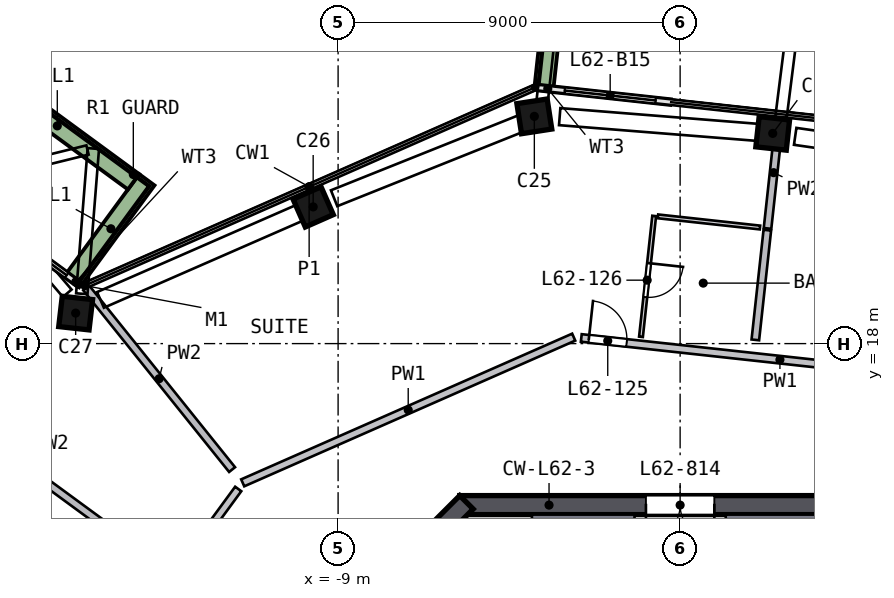
"""IFC4 building model, lengths in metres.
Left out: names, types, materials, properties, quantities, classifications, styles, units other than length and angle.
Written with IfcOpenShell. Run it as: python <this file> out.ifc"""

import sys

from ifc_helpers import new_model, si_unit, direction, frame, frame_2d, origin, origin_2d, place, context, subcontext, project, spatial, polyline, rectangle, outline, extrude, element, fill, save


model = new_model("IFC4")
c1 = context("Model", 3, precision=1e-05, world=origin(), true_north=direction((0.0, 1.0)))
c2 = subcontext(c1, "Body", "Model", "MODEL_VIEW")
j1 = project(units=[si_unit("LENGTHUNIT", "METRE"), si_unit("PLANEANGLEUNIT", "RADIAN")], contexts=[c1])
p1 = place(None, origin())
s1 = spatial("IfcSite", under=j1, at=p1, CompositionType="ELEMENT")
p2 = place(p1, origin())
s2 = spatial("IfcBuilding", under=s1, at=p2, CompositionType="ELEMENT")
p3 = place(p2, frame((0.0, 0.0, 252.5)))
s3 = spatial("IfcBuildingStorey", under=s2, at=p3, CompositionType="ELEMENT", Elevation=252.5)
p4 = place(p3, frame((2.572, 23.518, 0.0), z_axis=(-0.112018614, 0.011255095, 0.993642367), x_axis=(-0.987786416, 0.107722097, -0.112578621)))
e1 = element("IfcColumn", 1, at=p4, inside=s3, PredefinedType="COLUMN", context=c2, shape_type="SweptSolid", body=[
    extrude(rectangle(XDim=0.8, YDim=0.8, at=origin_2d()), origin(), (0.0, 0.0, 1.0), 3.21),
])
p5 = place(p3, frame((-3.698, 24.003, 0.0), z_axis=(-0.114033037, -0.018549374, 0.993303774), x_axis=(0.981736484, 0.151151624, 0.115527761)))
e2 = element("IfcColumn", 2, at=p5, inside=s3, PredefinedType="COLUMN", context=c2, shape_type="SweptSolid", body=[
    extrude(rectangle(XDim=0.8, YDim=0.8, at=origin_2d()), origin(), (0.0, 0.0, 1.0), 3.211),
])
p6 = place(p3, frame((-9.532, 21.653, 0.0), z_axis=(-0.10266456, -0.046237076, 0.993640841), x_axis=(-0.909427025, -0.400331749, -0.112592085)))
e3 = element("IfcColumn", 3, at=p6, inside=s3, PredefinedType="COLUMN", context=c2, shape_type="SweptSolid", body=[
    extrude(rectangle(XDim=0.8, YDim=0.8, at=origin_2d()), origin(), (0.0, 0.0, 1.0), 3.21),
])
p7 = place(p3, frame((-15.798, 18.895, 0.0), z_axis=(-0.089233164, -0.07585579, 0.99311799), x_axis=(0.990082545, -0.115381755, 0.080147399)))
e4 = element("IfcColumn", 4, at=p7, inside=s3, PredefinedType="COLUMN", context=c2, shape_type="SweptSolid", body=[
    extrude(rectangle(XDim=0.8, YDim=0.8, at=origin_2d()), origin(), (0.0, 0.0, 1.0), 3.212),
])
p8 = place(p3, frame((5.799, 13.75, 0.0), z_axis=(0.0, 0.0, 1.0), x_axis=(-1.0, 0.0, 0.0)))
e5 = element("IfcWall", 5, at=p8, inside=s3, PredefinedType="SHEAR", context=c2, shape_type="SweptSolid", body=[
    extrude(rectangle(XDim=11.598, YDim=0.5, at=frame_2d((5.799, 0.0))), origin(), (0.0, 0.0, 1.0), 3.5),
])
p9 = place(p8, frame((4.899, 0.0, 0.0)))
e6 = element("IfcOpeningElement", 6, at=p9, cuts=e5, PredefinedType="OPENING", context=c2, shape_type="SweptSolid", body=[
    extrude(rectangle(XDim=1.8, YDim=2.1, at=frame_2d((0.9, 1.05))), frame((0.0, 0.26, 0.0), z_axis=(0.0, -1.0, 0.0), x_axis=(1.0, 0.0, 0.0)), (0.0, 0.0, 1.0), 0.52),
])
p10 = place(p3, frame((-5.622, 13.823, 0.0), z_axis=(0.0, 0.0, 1.0), x_axis=(-0.707106781, -0.707106781, 0.0)))
e7 = element("IfcWall", 7, at=p10, inside=s3, PredefinedType="SHEAR", context=c2, shape_type="SweptSolid", body=[
    extrude(rectangle(XDim=11.598, YDim=0.5, at=frame_2d((5.799, 0.0))), origin(), (0.0, 0.0, 1.0), 3.5),
])
p11 = place(p3, frame((-15.824, 19.564, 0.0), z_axis=(0.0, 0.0, 1.0), x_axis=(-0.806550088, 0.59116576, 0.0)))
e8 = element("IfcWall", 8, at=p11, inside=s3, PredefinedType="SOLIDWALL", context=c2, shape_type="SweptSolid", body=[
    extrude(rectangle(XDim=2.3, YDim=0.15, at=frame_2d((1.15, 0.0))), origin(), (0.0, 0.0, 1.0), 2.525),
])
p12 = place(p11, frame((0.4, 0.0, 0.0)))
e9 = element("IfcOpeningElement", 9, at=p12, cuts=e8, PredefinedType="OPENING", context=c2, shape_type="SweptSolid", body=[
    extrude(rectangle(XDim=1.5, YDim=2.4, at=frame_2d((0.75, 1.2))), frame((0.0, 0.085, 0.0), z_axis=(0.0, -1.0, 0.0), x_axis=(1.0, 0.0, 0.0)), (0.0, 0.0, 1.0), 0.17),
])
p13 = place(p3, frame((-0.25, 24.355, 0.0), z_axis=(0.0, 0.0, 1.0), x_axis=(-0.994075927, 0.108687864, 0.0)))
e10 = element("IfcWall", 10, at=p13, inside=s3, PredefinedType="SOLIDWALL", context=c2, shape_type="SweptSolid", body=[
    extrude(rectangle(XDim=3.504, YDim=0.15, at=frame_2d((1.752, 0.0))), origin(), (0.0, 0.0, 1.0), 2.525),
])
p14 = place(p13, frame((0.4, 0.0, 0.0)))
e11 = element("IfcOpeningElement", 11, at=p14, cuts=e10, PredefinedType="OPENING", context=c2, shape_type="SweptSolid", body=[
    extrude(rectangle(XDim=2.4, YDim=2.4, at=frame_2d((1.2, 1.2))), frame((0.0, 0.085, 0.0), z_axis=(0.0, -1.0, 0.0), x_axis=(1.0, 0.0, 0.0)), (0.0, 0.0, 1.0), 0.17),
])
p15 = place(p3, frame((-3.283, 27.478, 0.0), z_axis=(0.0, 0.0, 1.0), x_axis=(-0.108723798, -0.994071997, 0.0)))
e12 = element("IfcWall", 12, at=p15, inside=s3, PredefinedType="SOLIDWALL", context=c2, shape_type="SweptSolid", body=[
    extrude(rectangle(XDim=2.699, YDim=0.5, at=frame_2d((1.35, 0.0))), origin(), (0.0, 0.0, 1.0), 0.7),
])
p16 = place(p3, frame((-15.924, 19.732, 0.0), z_axis=(0.0, 0.0, 1.0), x_axis=(0.591221389, 0.806509311, 0.0)))
e13 = element("IfcWall", 13, at=p16, inside=s3, PredefinedType="SOLIDWALL", context=c2, shape_type="SweptSolid", body=[
    extrude(rectangle(XDim=3.199, YDim=0.5, at=frame_2d((1.6, 0.0))), origin(), (0.0, 0.0, 1.0), 0.7),
])
p17 = place(p3, frame((-14.382, 22.258, 0.0), z_axis=(0.0, 0.0, 1.0), x_axis=(-0.806539101, 0.59118075, 0.0)))
e14 = element("IfcWall", 14, at=p17, inside=s3, PredefinedType="SOLIDWALL", context=c2, shape_type="SweptSolid", body=[
    extrude(rectangle(XDim=4.977, YDim=0.5, at=frame_2d((2.488, 0.0))), origin(), (0.0, 0.0, 1.0), 0.7),
])
p18 = place(p3, origin())
e15 = element("IfcWall", 15, at=p18, inside=s3, PredefinedType="SOLIDWALL", context=c2, shape_type="SweptSolid", body=[
    extrude(outline(polyline([(3.9, 9.9), (3.7, 9.9), (3.7, 12.9), (1.4, 12.9), (1.4, 9.9), (1.2, 9.9), (1.2, 13.5), (3.9, 13.5), (3.9, 9.9)])), origin(), (0.0, 0.0, 1.0), 3.19),
])
p19 = place(p3, origin())
e16 = element("IfcWall", 16, at=p19, inside=s3, PredefinedType="SOLIDWALL", context=c2, shape_type="SweptSolid", body=[
    extrude(outline(polyline([(-3.9, 13.5), (-1.2, 13.5), (-1.2, 9.9), (-1.4, 9.9), (-1.4, 12.9), (-3.7, 12.9), (-3.7, 9.9), (-3.9, 9.9), (-3.9, 13.5)])), origin(), (0.0, 0.0, 1.0), 3.19),
])
p20 = place(p3, frame((-17.136, 6.66, 0.0), z_axis=(0.0, 0.0, 1.0), x_axis=(0.591171658, 0.806545765, 0.0)))
e17 = element("IfcWall", 17, at=p20, inside=s3, PredefinedType="SOLIDWALL", context=c2, shape_type="SweptSolid", body=[
    extrude(rectangle(XDim=9.317, YDim=0.2, at=frame_2d((4.658, 0.0))), origin(), (0.0, 0.0, 1.0), 3.19),
])
p21 = place(p20, frame((3.85, 0.0, 0.0)))
e18 = element("IfcOpeningElement", 18, at=p21, cuts=e17, PredefinedType="OPENING", context=c2, shape_type="SweptSolid", body=[
    extrude(rectangle(XDim=1.8, YDim=2.1, at=frame_2d((0.9, 1.05))), frame((0.0, 0.11, 0.0), z_axis=(0.0, -1.0, 0.0), x_axis=(1.0, 0.0, 0.0)), (0.0, 0.0, 1.0), 0.22),
])
p22 = place(p3, frame((-2.8, 18.17, 0.0), z_axis=(0.0, 0.0, 1.0), x_axis=(-0.915239358, -0.402910557, 0.0)))
e19 = element("IfcWall", 19, at=p22, inside=s3, PredefinedType="SOLIDWALL", context=c2, shape_type="SweptSolid", body=[
    extrude(rectangle(XDim=9.516, YDim=0.2, at=frame_2d((4.758, 0.0))), origin(), (0.0, 0.0, 1.0), 3.19),
])
p23 = place(p3, frame((-2.601, 18.148, 0.0), z_axis=(0.0, 0.0, 1.0), x_axis=(0.994076214, -0.108685238, 0.0)))
e20 = element("IfcWall", 20, at=p23, inside=s3, PredefinedType="SOLIDWALL", context=c2, shape_type="SweptSolid", body=[
    extrude(rectangle(XDim=9.115, YDim=0.2, at=frame_2d((4.558, 0.0))), origin(), (0.0, 0.0, 1.0), 3.19),
])
p24 = place(p23, frame((0.2, 0.0, 0.0)))
e21 = element("IfcOpeningElement", 21, at=p24, cuts=e20, PredefinedType="OPENING", context=c2, shape_type="SweptSolid", body=[
    extrude(rectangle(XDim=1.0, YDim=2.1, at=frame_2d((0.5, 1.05))), frame((0.0, 0.11, 0.0), z_axis=(0.0, -1.0, 0.0), x_axis=(1.0, 0.0, 0.0)), (0.0, 0.0, 1.0), 0.22),
])
p25 = place(p3, frame((-15.435, 9.32, 0.0), z_axis=(0.0, 0.0, 1.0), x_axis=(-0.806554833, 0.591159286, 0.0)))
e22 = element("IfcWall", 22, at=p25, inside=s3, PredefinedType="SOLIDWALL", context=c2, shape_type="SweptSolid", body=[
    extrude(rectangle(XDim=15.227, YDim=0.2, at=frame_2d((7.613, 0.0))), origin(), (0.0, 0.0, 1.0), 3.19),
])
p26 = place(p25, frame((4.75, 0.0, 0.0)))
e23 = element("IfcOpeningElement", 23, at=p26, cuts=e22, PredefinedType="OPENING", context=c2, shape_type="SweptSolid", body=[
    extrude(rectangle(XDim=1.0, YDim=2.1, at=frame_2d((0.5, 1.05))), frame((0.0, 0.11, 0.0), z_axis=(0.0, -1.0, 0.0), x_axis=(1.0, 0.0, 0.0)), (0.0, 0.0, 1.0), 0.22),
])
p27 = place(p3, frame((-25.756, 20.995, 0.0), z_axis=(0.0, 0.0, 1.0), x_axis=(0.806541585, -0.591177361, 0.0)))
e24 = element("IfcWall", 24, at=p27, inside=s3, PredefinedType="SOLIDWALL", context=c2, shape_type="SweptSolid", body=[
    extrude(rectangle(XDim=15.227, YDim=0.2, at=frame_2d((7.613, 0.0))), origin(), (0.0, 0.0, 1.0), 3.19),
])
p28 = place(p27, frame((4.8, 0.0, 0.0)))
e25 = element("IfcOpeningElement", 25, at=p28, cuts=e24, PredefinedType="OPENING", context=c2, shape_type="SweptSolid", body=[
    extrude(rectangle(XDim=1.0, YDim=2.1, at=frame_2d((0.5, 1.05))), frame((0.0, 0.11, 0.0), z_axis=(0.0, -1.0, 0.0), x_axis=(1.0, 0.0, 0.0)), (0.0, 0.0, 1.0), 0.22),
])
p29 = place(p3, frame((-15.629, 19.466, 0.0), z_axis=(0.0, 0.0, 1.0), x_axis=(0.626077852, -0.779760555, 0.0)))
e26 = element("IfcWall", 26, at=p29, inside=s3, PredefinedType="SOLIDWALL", context=c2, shape_type="SweptSolid", body=[
    extrude(rectangle(XDim=6.132, YDim=0.2, at=frame_2d((3.066, 0.0))), origin(), (0.0, 0.0, 1.0), 3.19),
])
p30 = place(p3, frame((1.979, 18.098, 0.0), z_axis=(0.0, 0.0, 1.0), x_axis=(0.108752544, 0.994068853, 0.0)))
e27 = element("IfcWall", 27, at=p30, inside=s3, PredefinedType="SOLIDWALL", context=c2, shape_type="SweptSolid", body=[
    extrude(rectangle(XDim=2.905, YDim=0.2, at=frame_2d((1.453, 0.0))), origin(), (0.0, 0.0, 1.0), 3.19),
])
p31 = place(p3, frame((2.3, 21.031, 0.0), z_axis=(0.0, 0.0, 1.0), x_axis=(0.10867934, 0.994076859, 0.0)))
e28 = element("IfcWall", 28, at=p31, inside=s3, PredefinedType="SOLIDWALL", context=c2, shape_type="SweptSolid", body=[
    extrude(rectangle(XDim=2.952, YDim=0.2, at=frame_2d((1.476, 0.0))), origin(), (0.0, 0.0, 1.0), 3.19),
])
p32 = place(p3, frame((-0.683, 21.359, 0.0), z_axis=(0.0, 0.0, 1.0), x_axis=(-0.108639421, -0.994081222, 0.0)))
e29 = element("IfcWall", 29, at=p32, inside=s3, PredefinedType="PARTITIONING", context=c2, shape_type="SweptSolid", body=[
    extrude(rectangle(XDim=3.2, YDim=0.1, at=frame_2d((1.6, 0.0))), origin(), (0.0, 0.0, 1.0), 3.19),
])
p33 = place(p32, frame((1.25, 0.0, 0.0)))
e30 = element("IfcOpeningElement", 30, at=p33, cuts=e29, PredefinedType="OPENING", context=c2, shape_type="SweptSolid", body=[
    extrude(rectangle(XDim=0.9, YDim=2.1, at=frame_2d((0.45, 1.05))), frame((0.0, 0.06, 0.0), z_axis=(0.0, -1.0, 0.0), x_axis=(1.0, 0.0, 0.0)), (0.0, 0.0, 1.0), 0.12),
])
p34 = place(p3, frame((-0.583, 21.348, 0.0), z_axis=(0.0, 0.0, 1.0), x_axis=(0.994076272, -0.108684708, 0.0)))
e31 = element("IfcWall", 31, at=p34, inside=s3, PredefinedType="PARTITIONING", context=c2, shape_type="SweptSolid", body=[
    extrude(rectangle(XDim=2.7, YDim=0.1, at=frame_2d((1.35, 0.0))), origin(), (0.0, 0.0, 1.0), 3.19),
])
p35 = place(p12, origin())
e32 = element("IfcDoor", 32, at=p35, inside=s3, OperationType="SLIDING_TO_LEFT", PredefinedType="DOOR", context=c2, shape_type="SweptSolid", body=[
    extrude(rectangle(XDim=1.5, YDim=2.4, at=frame_2d((0.75, 1.2))), frame((0.0, 0.025, 0.0), z_axis=(0.0, -1.0, 0.0), x_axis=(1.0, 0.0, 0.0)), (0.0, 0.0, 1.0), 0.05),
])
fill(e9, e32)
p36 = place(p14, origin())
e33 = element("IfcDoor", 33, at=p36, inside=s3, OperationType="SLIDING_TO_RIGHT", PredefinedType="DOOR", context=c2, shape_type="SweptSolid", body=[
    extrude(rectangle(XDim=2.4, YDim=2.4, at=frame_2d((1.2, 1.2))), frame((0.0, 0.025, 0.0), z_axis=(0.0, -1.0, 0.0), x_axis=(1.0, 0.0, 0.0)), (0.0, 0.0, 1.0), 0.05),
])
fill(e11, e33)
p37 = place(p9, origin())
e34 = element("IfcDoor", 34, at=p37, inside=s3, OperationType="DOUBLE_DOOR_SINGLE_SWING", PredefinedType="DOOR", context=c2, shape_type="SweptSolid", body=[
    extrude(rectangle(XDim=1.8, YDim=2.1, at=frame_2d((0.9, 1.05))), frame((0.0, 0.025, 0.0), z_axis=(0.0, -1.0, 0.0), x_axis=(1.0, 0.0, 0.0)), (0.0, 0.0, 1.0), 0.05),
])
fill(e6, e34)
p38 = place(p24, origin())
e35 = element("IfcDoor", 35, at=p38, inside=s3, OperationType="SINGLE_SWING_LEFT", PredefinedType="DOOR", context=c2, shape_type="SweptSolid", body=[
    extrude(rectangle(XDim=1.0, YDim=2.1, at=frame_2d((0.5, 1.05))), frame((0.0, 0.025, 0.0), z_axis=(0.0, -1.0, 0.0), x_axis=(1.0, 0.0, 0.0)), (0.0, 0.0, 1.0), 0.05),
])
fill(e21, e35)
p39 = place(p33, origin())
e36 = element("IfcDoor", 36, at=p39, inside=s3, OperationType="SINGLE_SWING_LEFT", PredefinedType="DOOR", context=c2, shape_type="SweptSolid", body=[
    extrude(rectangle(XDim=0.9, YDim=2.1, at=frame_2d((0.45, 1.05))), frame((0.0, 0.025, 0.0), z_axis=(0.0, -1.0, 0.0), x_axis=(1.0, 0.0, 0.0)), (0.0, 0.0, 1.0), 0.05),
])
fill(e30, e36)
save(model, sys.argv[1])
